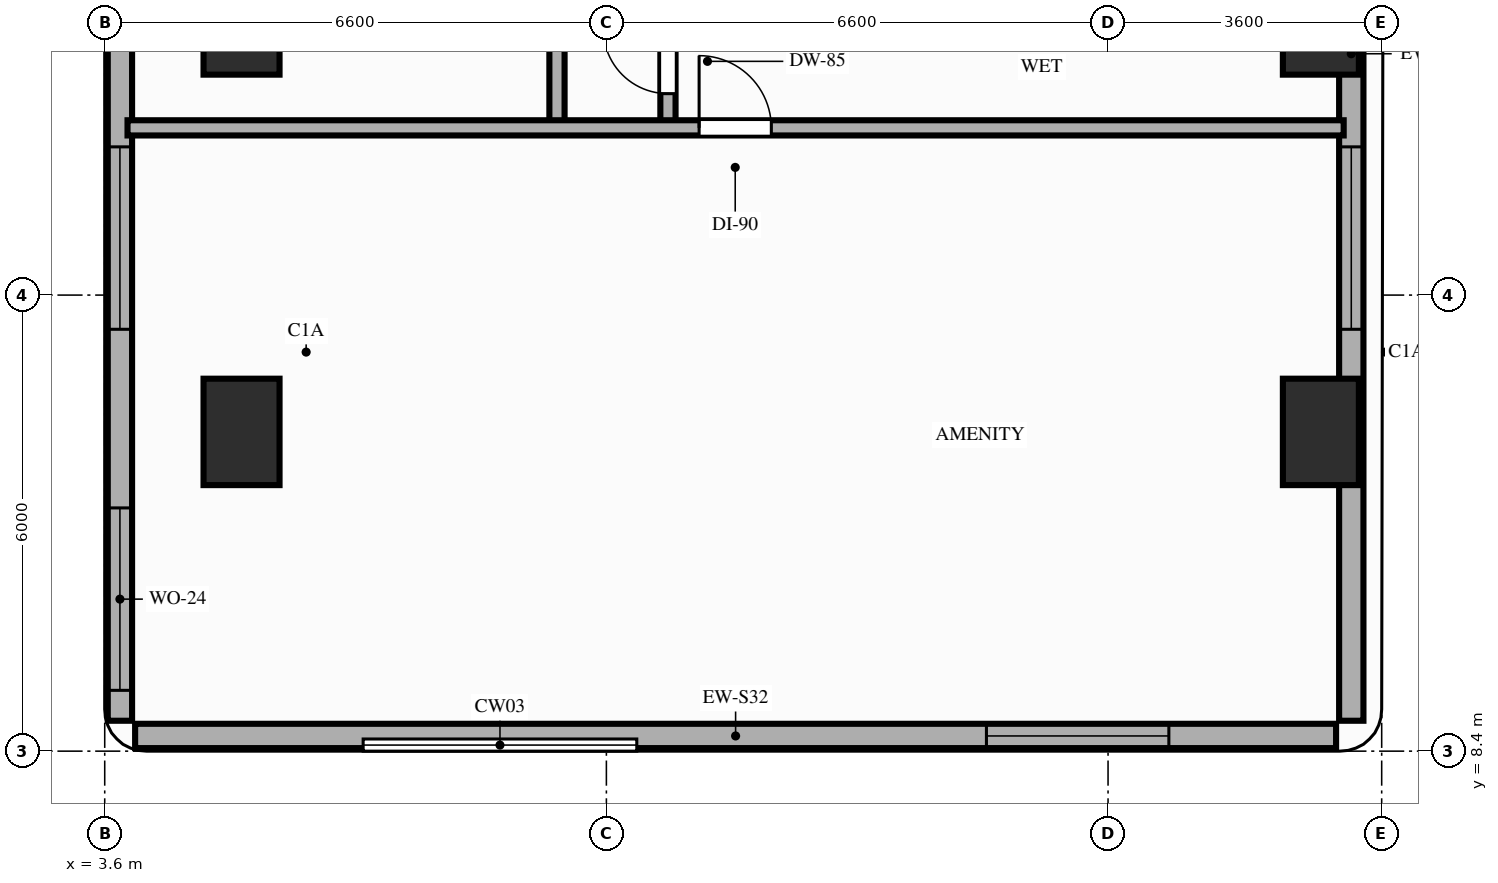
"""IFC4 building model, lengths in metres.
Left out: names, types, materials, properties, quantities, classifications, styles, units other than length and angle.
Written with IfcOpenShell. Run it as: python <this file> out.ifc"""

import sys

from ifc_helpers import new_model, si_unit, direction, frame, frame_2d, origin, origin_2d, place, context, subcontext, project, spatial, rectangle, extrude, element, fill, save


model = new_model("IFC4")
c1 = context("Model", 3, precision=1e-05, world=origin(), true_north=direction((0.0, 1.0)))
c2 = subcontext(c1, "Body", "Model", "MODEL_VIEW")
j1 = project(units=[si_unit("LENGTHUNIT", "METRE"), si_unit("PLANEANGLEUNIT", "RADIAN")], contexts=[c1])
p1 = place(None, origin())
s1 = spatial("IfcSite", under=j1, at=p1, CompositionType="ELEMENT")
p2 = place(p1, origin())
s2 = spatial("IfcBuilding", under=s1, at=p2, CompositionType="ELEMENT")
p3 = place(p2, frame((0.0, 0.0, 62.8)))
s3 = spatial("IfcBuildingStorey", under=s2, at=p3, CompositionType="ELEMENT", Elevation=62.8)
for number, where, z_axis, x_axis in (
    (1, (5.4, 12.6, 0.0), (0.0, 0.0, 1.0), (1.0, 0.0, 0.0)),
    (2, (19.6, 12.6, 0.0), (0.0, 0.0, 1.0), (1.0, 0.0, 0.0)),
    (3, (5.4, 18.0, 0.0), (0.0, 0.0, 1.0), (1.0, 0.0, 0.0)),
    (4, (19.6, 18.0, 0.0), (0.0, 0.0, 1.0), (1.0, 0.0, 0.0)),
):
    element("IfcColumn", number, at=place(p3, frame(where, z_axis=z_axis, x_axis=x_axis)), inside=s3, PredefinedType="COLUMN", context=c2, shape_type="SweptSolid", body=[
        extrude(rectangle(XDim=1.0, YDim=1.4, at=origin_2d()), origin(), (0.0, 0.0, 1.0), 3.2),
    ])
p4 = place(p3, frame((4.0, 8.6, 0.0), z_axis=(0.0, 0.0, 1.0), x_axis=(1.0, 0.0, 0.0)))
e5 = element("IfcWall", 5, at=p4, inside=s3, PredefinedType="STANDARD", context=c2, shape_type="SweptSolid", body=[
    extrude(rectangle(XDim=15.8, YDim=0.32, at=frame_2d((7.9, 0.0))), origin(), (0.0, 0.0, 1.0), 3.02),
])
p5 = place(p4, frame((11.2, 0.0, 0.85)))
e6 = element("IfcOpeningElement", 6, at=p5, cuts=e5, PredefinedType="OPENING", context=c2, shape_type="SweptSolid", body=[
    extrude(rectangle(XDim=2.4, YDim=1.8, at=frame_2d((1.2, 0.9))), frame((0.0, 0.17, 0.0), z_axis=(0.0, -1.0, 0.0), x_axis=(1.0, 0.0, 0.0)), (0.0, 0.0, 1.0), 0.34),
])
p6 = place(p3, frame((3.8, 42.1, 0.0), z_axis=(0.0, 0.0, 1.0), x_axis=(0.0, -1.0, 0.0)))
e7 = element("IfcWall", 7, at=p6, inside=s3, PredefinedType="STANDARD", context=c2, shape_type="SweptSolid", body=[
    extrude(rectangle(XDim=33.3, YDim=0.32, at=frame_2d((16.65, 0.0))), origin(), (0.0, 0.0, 1.0), 2.7),
])
p7 = place(p6, frame((30.5, 0.0, 0.85)))
e8 = element("IfcOpeningElement", 8, at=p7, cuts=e7, PredefinedType="OPENING", context=c2, shape_type="SweptSolid", body=[
    extrude(rectangle(XDim=2.4, YDim=1.6, at=frame_2d((1.2, 0.8))), frame((0.0, 0.17, 0.0), z_axis=(0.0, -1.0, 0.0), x_axis=(1.0, 0.0, 0.0)), (0.0, 0.0, 1.0), 0.34),
])
p8 = place(p6, frame((25.75, 0.0, 0.85)))
e9 = element("IfcOpeningElement", 9, at=p8, cuts=e7, PredefinedType="OPENING", context=c2, shape_type="SweptSolid", body=[
    extrude(rectangle(XDim=2.4, YDim=1.6, at=frame_2d((1.2, 0.8))), frame((0.0, 0.17, 0.0), z_axis=(0.0, -1.0, 0.0), x_axis=(1.0, 0.0, 0.0)), (0.0, 0.0, 1.0), 0.34),
])
p9 = place(p6, frame((20.03, 0.0, 0.85)))
e10 = element("IfcOpeningElement", 10, at=p9, cuts=e7, PredefinedType="OPENING", context=c2, shape_type="SweptSolid", body=[
    extrude(rectangle(XDim=2.0, YDim=1.6, at=frame_2d((1.0, 0.8))), frame((0.0, 0.17, 0.0), z_axis=(0.0, -1.0, 0.0), x_axis=(1.0, 0.0, 0.0)), (0.0, 0.0, 1.0), 0.34),
])
p10 = place(p6, frame((14.41, 0.0, 0.85)))
e11 = element("IfcOpeningElement", 11, at=p10, cuts=e7, PredefinedType="OPENING", context=c2, shape_type="SweptSolid", body=[
    extrude(rectangle(XDim=2.1, YDim=1.6, at=frame_2d((1.05, 0.8))), frame((0.0, 0.17, 0.0), z_axis=(0.0, -1.0, 0.0), x_axis=(1.0, 0.0, 0.0)), (0.0, 0.0, 1.0), 0.34),
])
p11 = place(p6, frame((9.6, 0.0, 0.85)))
e12 = element("IfcOpeningElement", 12, at=p11, cuts=e7, PredefinedType="OPENING", context=c2, shape_type="SweptSolid", body=[
    extrude(rectangle(XDim=2.4, YDim=1.6, at=frame_2d((1.2, 0.8))), frame((0.0, 0.17, 0.0), z_axis=(0.0, -1.0, 0.0), x_axis=(1.0, 0.0, 0.0)), (0.0, 0.0, 1.0), 0.34),
])
p12 = place(p6, frame((3.5, 0.0, 0.85)))
e13 = element("IfcOpeningElement", 13, at=p12, cuts=e7, PredefinedType="OPENING", context=c2, shape_type="SweptSolid", body=[
    extrude(rectangle(XDim=2.4, YDim=1.6, at=frame_2d((1.2, 0.8))), frame((0.0, 0.17, 0.0), z_axis=(0.0, -1.0, 0.0), x_axis=(1.0, 0.0, 0.0)), (0.0, 0.0, 1.0), 0.34),
])
p13 = place(p3, frame((20.0, 8.8, 0.0), z_axis=(0.0, 0.0, 1.0), x_axis=(0.0, 1.0, 0.0)))
e14 = element("IfcWall", 14, at=p13, inside=s3, PredefinedType="STANDARD", context=c2, shape_type="SweptSolid", body=[
    extrude(rectangle(XDim=17.55, YDim=0.32, at=frame_2d((8.775, 0.0))), origin(), (0.0, 0.0, 1.0), 2.4),
])
p14 = place(p13, frame((5.15, 0.0, 0.85)))
e15 = element("IfcOpeningElement", 15, at=p14, cuts=e14, PredefinedType="OPENING", context=c2, shape_type="SweptSolid", body=[
    extrude(rectangle(XDim=2.4, YDim=1.3, at=frame_2d((1.2, 0.65))), frame((0.0, 0.17, 0.0), z_axis=(0.0, -1.0, 0.0), x_axis=(1.0, 0.0, 0.0)), (0.0, 0.0, 1.0), 0.34),
])
p15 = place(p13, frame((11.25, 0.0, 0.85)))
e16 = element("IfcOpeningElement", 16, at=p15, cuts=e14, PredefinedType="OPENING", context=c2, shape_type="SweptSolid", body=[
    extrude(rectangle(XDim=2.4, YDim=1.3, at=frame_2d((1.2, 0.65))), frame((0.0, 0.17, 0.0), z_axis=(0.0, -1.0, 0.0), x_axis=(1.0, 0.0, 0.0)), (0.0, 0.0, 1.0), 0.34),
])
p16 = place(p3, frame((9.55, 16.6, 0.0), z_axis=(0.0, 0.0, 1.0), x_axis=(0.0, 1.0, 0.0)))
e17 = element("IfcWall", 17, at=p16, inside=s3, PredefinedType="PARTITIONING", context=c2, shape_type="SweptSolid", body=[
    extrude(rectangle(XDim=11.5, YDim=0.2, at=frame_2d((5.75, 0.0))), origin(), (0.0, 0.0, 1.0), 2.4),
])
p17 = place(p16, frame((1.13, 0.0, 0.0)))
e18 = element("IfcOpeningElement", 18, at=p17, cuts=e17, PredefinedType="OPENING", context=c2, shape_type="SweptSolid", body=[
    extrude(rectangle(XDim=0.95, YDim=2.15, at=frame_2d((0.475, 1.075))), frame((0.0, 0.11, 0.0), z_axis=(0.0, -1.0, 0.0), x_axis=(1.0, 0.0, 0.0)), (0.0, 0.0, 1.0), 0.22),
])
p18 = place(p16, frame((4.0, 0.0, 0.0)))
e19 = element("IfcOpeningElement", 19, at=p18, cuts=e17, PredefinedType="OPENING", context=c2, shape_type="SweptSolid", body=[
    extrude(rectangle(XDim=0.95, YDim=2.15, at=frame_2d((0.475, 1.075))), frame((0.0, 0.11, 0.0), z_axis=(0.0, -1.0, 0.0), x_axis=(1.0, 0.0, 0.0)), (0.0, 0.0, 1.0), 0.22),
])
p19 = place(p16, frame((6.76, 0.0, 0.0)))
e20 = element("IfcOpeningElement", 20, at=p19, cuts=e17, PredefinedType="OPENING", context=c2, shape_type="SweptSolid", body=[
    extrude(rectangle(XDim=0.95, YDim=2.15, at=frame_2d((0.475, 1.075))), frame((0.0, 0.11, 0.0), z_axis=(0.0, -1.0, 0.0), x_axis=(1.0, 0.0, 0.0)), (0.0, 0.0, 1.0), 0.22),
])
p20 = place(p16, frame((9.64, 0.0, 0.0)))
e21 = element("IfcOpeningElement", 21, at=p20, cuts=e17, PredefinedType="OPENING", context=c2, shape_type="SweptSolid", body=[
    extrude(rectangle(XDim=0.95, YDim=2.15, at=frame_2d((0.475, 1.075))), frame((0.0, 0.11, 0.0), z_axis=(0.0, -1.0, 0.0), x_axis=(1.0, 0.0, 0.0)), (0.0, 0.0, 1.0), 0.22),
])
p21 = place(p3, frame((11.01, 16.6, 0.0), z_axis=(0.0, 0.0, 1.0), x_axis=(0.0, 1.0, 0.0)))
e22 = element("IfcWall", 22, at=p21, inside=s3, PredefinedType="PARTITIONING", context=c2, shape_type="SweptSolid", body=[
    extrude(rectangle(XDim=11.5, YDim=0.2, at=frame_2d((5.75, 0.0))), origin(), (0.0, 0.0, 1.0), 2.4),
])
p22 = place(p21, frame((0.45, 0.0, 0.0)))
e23 = element("IfcOpeningElement", 23, at=p22, cuts=e22, PredefinedType="OPENING", context=c2, shape_type="SweptSolid", body=[
    extrude(rectangle(XDim=0.85, YDim=2.1, at=frame_2d((0.425, 1.05))), frame((0.0, 0.11, 0.0), z_axis=(0.0, -1.0, 0.0), x_axis=(1.0, 0.0, 0.0)), (0.0, 0.0, 1.0), 0.22),
])
p23 = place(p21, frame((1.93, 0.0, 0.0)))
e24 = element("IfcOpeningElement", 24, at=p23, cuts=e22, PredefinedType="OPENING", context=c2, shape_type="SweptSolid", body=[
    extrude(rectangle(XDim=0.95, YDim=2.1, at=frame_2d((0.475, 1.05))), frame((0.0, 0.11, 0.0), z_axis=(0.0, -1.0, 0.0), x_axis=(1.0, 0.0, 0.0)), (0.0, 0.0, 1.0), 0.22),
])
p24 = place(p21, frame((5.31, 0.0, 0.0)))
e25 = element("IfcOpeningElement", 25, at=p24, cuts=e22, PredefinedType="OPENING", context=c2, shape_type="SweptSolid", body=[
    extrude(rectangle(XDim=1.0, YDim=2.15, at=frame_2d((0.5, 1.075))), frame((0.0, 0.11, 0.0), z_axis=(0.0, -1.0, 0.0), x_axis=(1.0, 0.0, 0.0)), (0.0, 0.0, 1.0), 0.22),
])
p25 = place(p21, frame((9.46, 0.0, 0.0)))
e26 = element("IfcOpeningElement", 26, at=p25, cuts=e22, PredefinedType="OPENING", context=c2, shape_type="SweptSolid", body=[
    extrude(rectangle(XDim=1.0, YDim=2.15, at=frame_2d((0.5, 1.075))), frame((0.0, 0.11, 0.0), z_axis=(0.0, -1.0, 0.0), x_axis=(1.0, 0.0, 0.0)), (0.0, 0.0, 1.0), 0.22),
])
p26 = place(p3, frame((3.9, 16.6, 0.0), z_axis=(0.0, 0.0, 1.0), x_axis=(1.0, 0.0, 0.0)))
e27 = element("IfcWall", 27, at=p26, inside=s3, PredefinedType="PARTITIONING", context=c2, shape_type="SweptSolid", body=[
    extrude(rectangle(XDim=16.0, YDim=0.2, at=frame_2d((8.0, 0.0))), origin(), (0.0, 0.0, 1.0), 2.4),
])
p27 = place(p26, frame((7.52, 0.0, 0.0)))
e28 = element("IfcOpeningElement", 28, at=p27, cuts=e27, PredefinedType="OPENING", context=c2, shape_type="SweptSolid", body=[
    extrude(rectangle(XDim=0.95, YDim=2.15, at=frame_2d((0.475, 1.075))), frame((0.0, 0.11, 0.0), z_axis=(0.0, -1.0, 0.0), x_axis=(1.0, 0.0, 0.0)), (0.0, 0.0, 1.0), 0.22),
])
p28 = place(p7, origin())
e29 = element("IfcWindow", 29, at=p28, inside=s3, PartitioningType="SINGLE_PANEL", PredefinedType="WINDOW", context=c2, shape_type="SweptSolid", body=[
    extrude(rectangle(XDim=2.4, YDim=1.6, at=frame_2d((1.2, 0.8))), frame((0.0, 0.03, 0.0), z_axis=(0.0, -1.0, 0.0), x_axis=(1.0, 0.0, 0.0)), (0.0, 0.0, 1.0), 0.06),
])
fill(e8, e29)
p29 = place(p8, origin())
e30 = element("IfcWindow", 30, at=p29, inside=s3, PartitioningType="SINGLE_PANEL", PredefinedType="WINDOW", context=c2, shape_type="SweptSolid", body=[
    extrude(rectangle(XDim=2.4, YDim=1.6, at=frame_2d((1.2, 0.8))), frame((0.0, 0.03, 0.0), z_axis=(0.0, -1.0, 0.0), x_axis=(1.0, 0.0, 0.0)), (0.0, 0.0, 1.0), 0.06),
])
fill(e9, e30)
p30 = place(p14, origin())
e31 = element("IfcWindow", 31, at=p30, inside=s3, PartitioningType="SINGLE_PANEL", PredefinedType="WINDOW", context=c2, shape_type="SweptSolid", body=[
    extrude(rectangle(XDim=2.4, YDim=1.3, at=frame_2d((1.2, 0.65))), frame((0.0, 0.03, 0.0), z_axis=(0.0, -1.0, 0.0), x_axis=(1.0, 0.0, 0.0)), (0.0, 0.0, 1.0), 0.06),
])
fill(e15, e31)
p31 = place(p5, origin())
e32 = element("IfcWindow", 32, at=p31, inside=s3, PartitioningType="SINGLE_PANEL", PredefinedType="WINDOW", context=c2, shape_type="SweptSolid", body=[
    extrude(rectangle(XDim=2.4, YDim=1.8, at=frame_2d((1.2, 0.9))), frame((0.0, 0.03, 0.0), z_axis=(0.0, -1.0, 0.0), x_axis=(1.0, 0.0, 0.0)), (0.0, 0.0, 1.0), 0.06),
])
fill(e6, e32)
p32 = place(p27, origin())
e33 = element("IfcDoor", 33, at=p32, inside=s3, OperationType="SINGLE_SWING_LEFT", PredefinedType="DOOR", context=c2, shape_type="SweptSolid", body=[
    extrude(rectangle(XDim=0.95, YDim=2.15, at=frame_2d((0.475, 1.075))), frame((0.0, 0.025, 0.0), z_axis=(0.0, -1.0, 0.0), x_axis=(1.0, 0.0, 0.0)), (0.0, 0.0, 1.0), 0.05),
])
fill(e28, e33)
p33 = place(p22, origin())
e34 = element("IfcDoor", 34, at=p33, inside=s3, OperationType="SINGLE_SWING_RIGHT", PredefinedType="DOOR", context=c2, shape_type="SweptSolid", body=[
    extrude(rectangle(XDim=0.85, YDim=2.1, at=frame_2d((0.425, 1.05))), frame((0.0, 0.025, 0.0), z_axis=(0.0, -1.0, 0.0), x_axis=(1.0, 0.0, 0.0)), (0.0, 0.0, 1.0), 0.05),
])
fill(e23, e34)
save(model, sys.argv[1])
